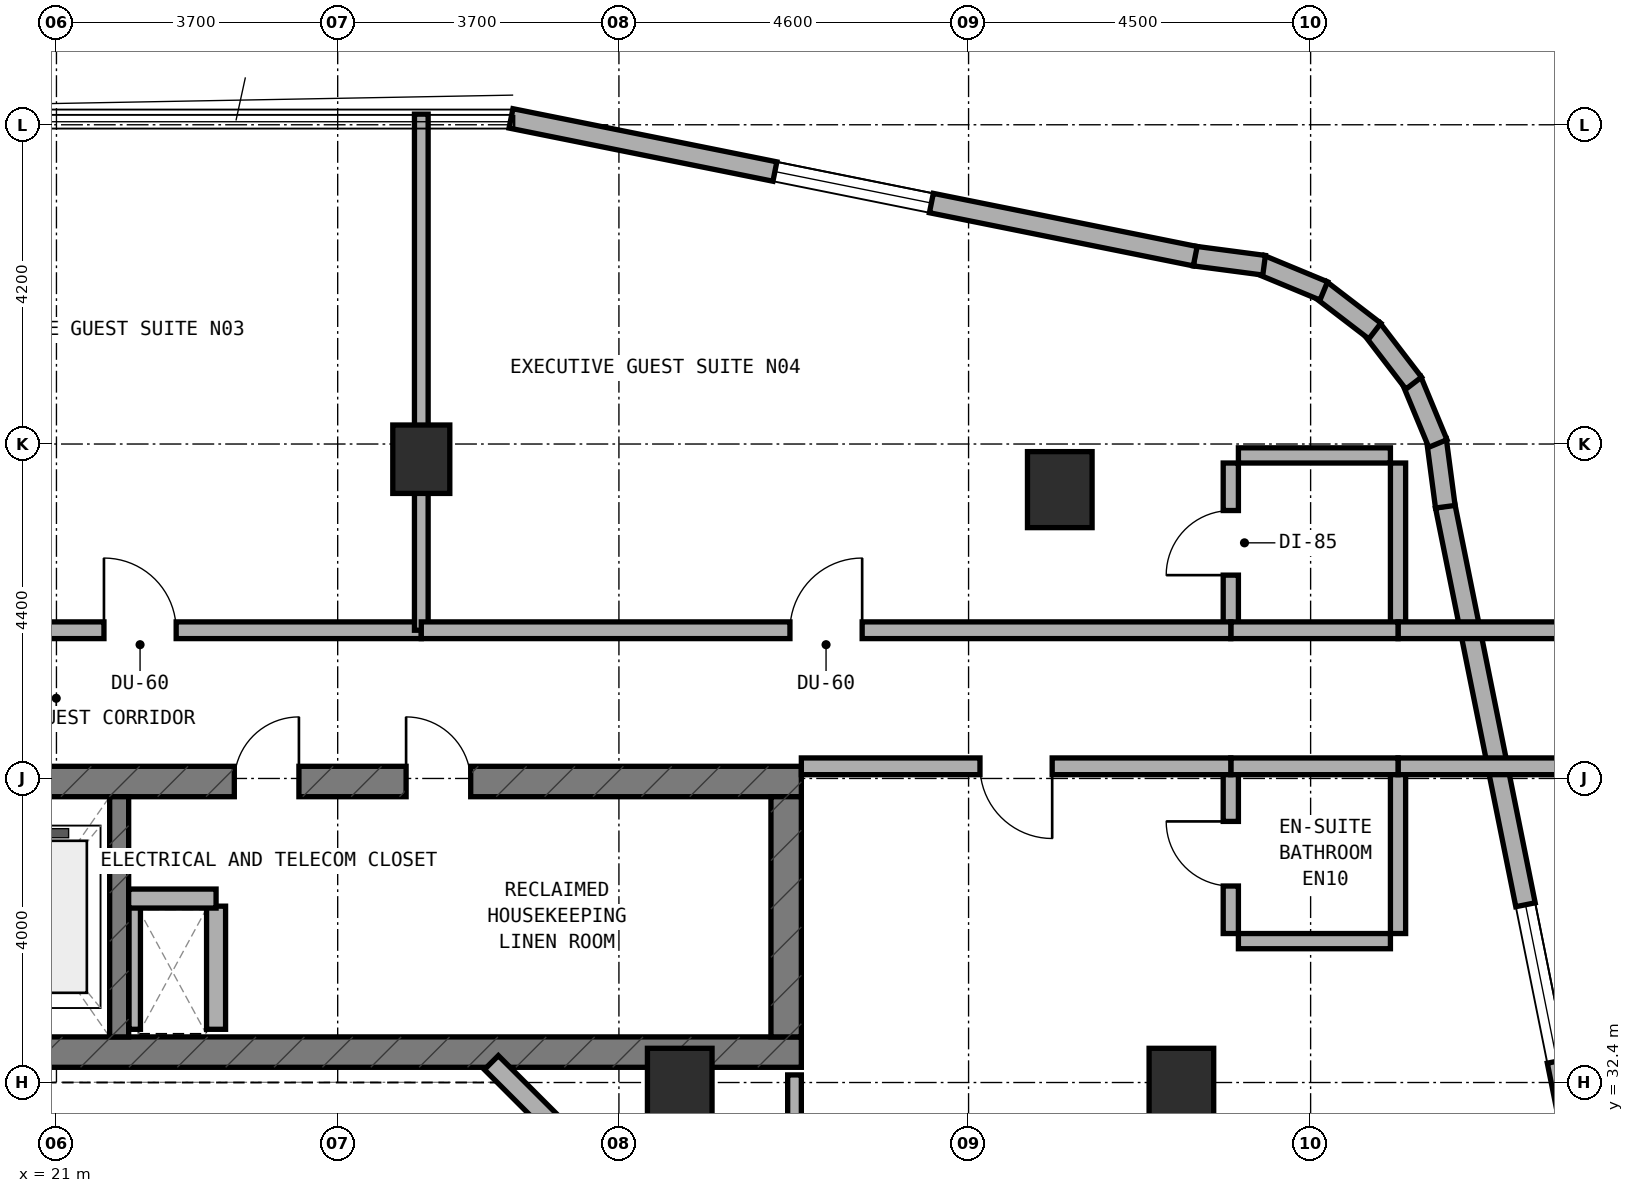
"""IFC4 building model, lengths in metres.
Left out: names, types, materials, properties, quantities, classifications, styles, units other than length and angle.
Written with IfcOpenShell. Run it as: python <this file> out.ifc"""

import sys

from ifc_helpers import new_model, si_unit, direction, frame, frame_2d, origin, origin_2d, place, context, subcontext, project, spatial, rectangle, extrude, element, fill, save


model = new_model("IFC4")
c1 = context("Model", 3, precision=1e-05, world=origin(), true_north=direction((0.0, 1.0)))
c2 = subcontext(c1, "Body", "Model", "MODEL_VIEW")
j1 = project(units=[si_unit("LENGTHUNIT", "METRE"), si_unit("PLANEANGLEUNIT", "RADIAN")], contexts=[c1])
p1 = place(None, origin())
s1 = spatial("IfcSite", under=j1, at=p1, CompositionType="ELEMENT")
p2 = place(p1, origin())
s2 = spatial("IfcBuilding", under=s1, at=p2, CompositionType="ELEMENT")
p3 = place(p2, frame((0.0, 0.0, 159.0)))
s3 = spatial("IfcBuildingStorey", under=s2, at=p3, CompositionType="ELEMENT", Elevation=159.0)
p4 = place(p3, frame((6.4, 32.8, 0.0), z_axis=(0.0, 0.0, 1.0), x_axis=(1.0, 0.0, 0.0)))
e1 = element("IfcWall", 1, at=p4, inside=s3, PredefinedType="SHEAR", context=c2, shape_type="SweptSolid", body=[
    extrude(rectangle(XDim=24.4, YDim=0.4, at=frame_2d((12.2, 0.0))), origin(), (0.0, 0.0, 1.0), 3.5),
])
p5 = place(p4, frame((6.05, 0.0, 0.0)))
e2 = element("IfcOpeningElement", 2, at=p5, cuts=e1, PredefinedType="OPENING", context=c2, shape_type="SweptSolid", body=[
    extrude(rectangle(XDim=1.1, YDim=2.15, at=frame_2d((0.55, 1.075))), frame((0.0, 0.21, 0.0), z_axis=(0.0, -1.0, 0.0), x_axis=(1.0, 0.0, 0.0)), (0.0, 0.0, 1.0), 0.42),
])
p6 = place(p3, frame((6.4, 36.36, 0.0), z_axis=(0.0, 0.0, 1.0), x_axis=(1.0, 0.0, 0.0)))
e3 = element("IfcWall", 3, at=p6, inside=s3, PredefinedType="SHEAR", context=c2, shape_type="SweptSolid", body=[
    extrude(rectangle(XDim=24.4, YDim=0.4, at=frame_2d((12.2, 0.0))), origin(), (0.0, 0.0, 1.0), 3.5),
])
p7 = place(p6, frame((9.15, 0.0, 0.0)))
e4 = element("IfcOpeningElement", 4, at=p7, cuts=e3, PredefinedType="OPENING", context=c2, shape_type="SweptSolid", body=[
    extrude(rectangle(XDim=1.2, YDim=2.15, at=frame_2d((0.6, 1.075))), frame((0.0, 0.21, 0.0), z_axis=(0.0, -1.0, 0.0), x_axis=(1.0, 0.0, 0.0)), (0.0, 0.0, 1.0), 0.42),
])
p8 = place(p6, frame((19.2, 0.0, 0.0)))
e5 = element("IfcOpeningElement", 5, at=p8, cuts=e3, PredefinedType="OPENING", context=c2, shape_type="SweptSolid", body=[
    extrude(rectangle(XDim=0.85, YDim=2.1, at=frame_2d((0.425, 1.05))), frame((0.0, 0.21, 0.0), z_axis=(0.0, -1.0, 0.0), x_axis=(1.0, 0.0, 0.0)), (0.0, 0.0, 1.0), 0.42),
])
p9 = place(p6, frame((16.94, 0.0, 0.0)))
e6 = element("IfcOpeningElement", 6, at=p9, cuts=e3, PredefinedType="OPENING", context=c2, shape_type="SweptSolid", body=[
    extrude(rectangle(XDim=0.85, YDim=2.1, at=frame_2d((0.425, 1.05))), frame((0.0, 0.21, 0.0), z_axis=(0.0, -1.0, 0.0), x_axis=(1.0, 0.0, 0.0)), (0.0, 0.0, 1.0), 0.42),
])
p10 = place(p3, frame((30.6, 33.0, 0.0), z_axis=(0.0, 0.0, 1.0), x_axis=(0.0, 1.0, 0.0)))
e7 = element("IfcWall", 7, at=p10, inside=s3, PredefinedType="SHEAR", context=c2, shape_type="SweptSolid", body=[
    extrude(rectangle(XDim=3.16, YDim=0.4, at=frame_2d((1.58, 0.0))), origin(), (0.0, 0.0, 1.0), 3.5),
])
p11 = place(p3, frame((21.825, 33.0, 0.0), z_axis=(0.0, 0.0, 1.0), x_axis=(0.0, 1.0, 0.0)))
e8 = element("IfcWall", 8, at=p11, inside=s3, PredefinedType="STANDARD", context=c2, shape_type="SweptSolid", body=[
    extrude(rectangle(XDim=3.16, YDim=0.25, at=frame_2d((1.58, 0.0))), origin(), (0.0, 0.0, 1.0), 3.22),
])
p12 = place(p3, frame((25.8, 40.6, 0.0), z_axis=(0.0, 0.0, 1.0), x_axis=(1.0, 0.0, 0.0)))
e9 = element("IfcColumn", 9, at=p12, inside=s3, PredefinedType="COLUMN", context=c2, shape_type="SweptSolid", body=[
    extrude(rectangle(XDim=0.75, YDim=0.9, at=origin_2d()), origin(), (0.0, 0.0, 1.0), 3.5),
])
for number, where, z_axis, x_axis in (
    (10, (34.2, 40.2, 0.0), (0.0, 0.0, 1.0), (1.0, 0.0, 0.0)),
    (11, (35.8, 32.35, 0.0), (0.0, 0.0, 1.0), (1.0, 0.0, 0.0)),
    (12, (29.2, 32.35, 0.0), (0.0, 0.0, 1.0), (1.0, 0.0, 0.0)),
):
    element("IfcColumn", number, at=place(p3, frame(where, z_axis=z_axis, x_axis=x_axis)), inside=s3, PredefinedType="COLUMN", context=c2, shape_type="SweptSolid", body=[
        extrude(rectangle(XDim=0.85, YDim=1.0, at=origin_2d()), origin(), (0.0, 0.0, 1.0), 3.5),
    ])
p13 = place(p3, frame((41.084, 30.98, 0.0), z_axis=(0.0, 0.0, 1.0), x_axis=(-0.197435082048, 0.980315963543, 0.0)))
e13 = element("IfcWall", 13, at=p13, inside=s3, PredefinedType="STANDARD", context=c2, shape_type="SweptSolid", body=[
    extrude(rectangle(XDim=9.183, YDim=0.26, at=frame_2d((4.591, 0.0))), origin(), (0.0, 0.0, 1.0), 3.22),
])
p14 = place(p13, frame((1.734, 0.0, 0.85)))
e14 = element("IfcOpeningElement", 14, at=p14, cuts=e13, PredefinedType="OPENING", context=c2, shape_type="SweptSolid", body=[
    extrude(rectangle(XDim=2.1, YDim=1.5, at=frame_2d((1.05, 0.75))), frame((0.0, 0.14, 0.0), z_axis=(0.0, -1.0, 0.0), x_axis=(1.0, 0.0, 0.0)), (0.0, 0.0, 1.0), 0.28),
])
p15 = place(p3, frame((39.272, 39.975, 0.0), z_axis=(0.0, 0.0, 1.0), x_axis=(-0.130953706898, 0.991388484223, 0.0)))
e15 = element("IfcWall", 15, at=p15, inside=s3, PredefinedType="STANDARD", context=c2, shape_type="SweptSolid", body=[
    extrude(rectangle(XDim=0.885, YDim=0.26, at=frame_2d((0.443, 0.0))), origin(), (0.0, 0.0, 1.0), 3.22),
])
p16 = place(p3, frame((39.174, 40.807, 0.0), z_axis=(0.0, 0.0, 1.0), x_axis=(-0.383290660547, 0.923627776508, 0.0)))
e16 = element("IfcWall", 16, at=p16, inside=s3, PredefinedType="STANDARD", context=c2, shape_type="SweptSolid", body=[
    extrude(rectangle(XDim=0.903, YDim=0.26, at=frame_2d((0.452, 0.0))), origin(), (0.0, 0.0, 1.0), 3.22),
])
p17 = place(p3, frame((38.856, 41.601, 0.0), z_axis=(0.0, 0.0, 1.0), x_axis=(-0.608624690463, 0.793458244748, 0.0)))
e17 = element("IfcWall", 17, at=p17, inside=s3, PredefinedType="STANDARD", context=c2, shape_type="SweptSolid", body=[
    extrude(rectangle(XDim=0.902, YDim=0.26, at=frame_2d((0.451, 0.0))), origin(), (0.0, 0.0, 1.0), 3.22),
])
p18 = place(p3, frame((38.345, 42.286, 0.0), z_axis=(0.0, 0.0, 1.0), x_axis=(-0.793558456666, 0.608494022858, 0.0)))
e18 = element("IfcWall", 18, at=p18, inside=s3, PredefinedType="STANDARD", context=c2, shape_type="SweptSolid", body=[
    extrude(rectangle(XDim=0.902, YDim=0.26, at=frame_2d((0.451, 0.0))), origin(), (0.0, 0.0, 1.0), 3.22),
])
p19 = place(p3, frame((37.673, 42.814, 0.0), z_axis=(0.0, 0.0, 1.0), x_axis=(-0.923683767999, 0.383155708213, 0.0)))
e19 = element("IfcWall", 19, at=p19, inside=s3, PredefinedType="STANDARD", context=c2, shape_type="SweptSolid", body=[
    extrude(rectangle(XDim=0.903, YDim=0.26, at=frame_2d((0.451, 0.0))), origin(), (0.0, 0.0, 1.0), 3.22),
])
p20 = place(p3, frame((36.888, 43.152, 0.0), z_axis=(0.0, 0.0, 1.0), x_axis=(-0.991487658083, 0.130200706103, 0.0)))
e20 = element("IfcWall", 20, at=p20, inside=s3, PredefinedType="STANDARD", context=c2, shape_type="SweptSolid", body=[
    extrude(rectangle(XDim=0.921, YDim=0.26, at=frame_2d((0.46, 0.0))), origin(), (0.0, 0.0, 1.0), 3.22),
])
p21 = place(p3, frame((35.982, 43.271, 0.0), z_axis=(0.0, 0.0, 1.0), x_axis=(-0.980315963543, 0.197435082048, 0.0)))
e21 = element("IfcWall", 21, at=p21, inside=s3, PredefinedType="STANDARD", context=c2, shape_type="SweptSolid", body=[
    extrude(rectangle(XDim=9.183, YDim=0.26, at=frame_2d((4.591, 0.0))), origin(), (0.0, 0.0, 1.0), 3.22),
])
p22 = place(p21, frame((3.541, 0.0, 0.85)))
e22 = element("IfcOpeningElement", 22, at=p22, cuts=e21, PredefinedType="OPENING", context=c2, shape_type="SweptSolid", body=[
    extrude(rectangle(XDim=2.1, YDim=1.5, at=frame_2d((1.05, 0.75))), frame((0.0, 0.14, 0.0), z_axis=(0.0, -1.0, 0.0), x_axis=(1.0, 0.0, 0.0)), (0.0, 0.0, 1.0), 0.28),
])
p23 = place(p3, frame((28.556, 30.828, 0.0), z_axis=(0.0, 0.0, 1.0), x_axis=(-0.707059717605, 0.707153841636, 0.0)))
e23 = element("IfcWall", 23, at=p23, inside=s3, PredefinedType="STANDARD", context=c2, shape_type="SweptSolid", body=[
    extrude(rectangle(XDim=2.594, YDim=0.26, at=frame_2d((1.297, 0.0))), origin(), (0.0, 0.0, 1.0), 3.22),
])
p24 = place(p3, frame((22.03, 33.1, 0.0), z_axis=(0.0, 0.0, 1.0), x_axis=(0.0, 1.0, 0.0)))
e24 = element("IfcWall", 24, at=p24, inside=s3, PredefinedType="PARTITIONING", context=c2, shape_type="SweptSolid", body=[
    extrude(rectangle(XDim=1.62, YDim=0.15, at=frame_2d((0.81, 0.0))), origin(), (0.0, 0.0, 1.0), 3.22),
])
p25 = place(p3, frame((23.1, 33.1, 0.0), z_axis=(0.0, 0.0, 1.0), x_axis=(0.0, 1.0, 0.0)))
e25 = element("IfcWall", 25, at=p25, inside=s3, PredefinedType="SOLIDWALL", context=c2, shape_type="SweptSolid", body=[
    extrude(rectangle(XDim=1.62, YDim=0.25, at=frame_2d((0.81, 0.0))), origin(), (0.0, 0.0, 1.0), 3.22),
])
p26 = place(p3, frame((21.95, 34.82, 0.0), z_axis=(0.0, 0.0, 1.0), x_axis=(1.0, 0.0, 0.0)))
e26 = element("IfcWall", 26, at=p26, inside=s3, PredefinedType="SOLIDWALL", context=c2, shape_type="SweptSolid", body=[
    extrude(rectangle(XDim=1.15, YDim=0.25, at=frame_2d((0.575, 0.0))), origin(), (0.0, 0.0, 1.0), 3.22),
])
p27 = place(p3, frame((18.4, 38.35, 0.0), z_axis=(0.0, 0.0, 1.0), x_axis=(1.0, 0.0, 0.0)))
e27 = element("IfcWall", 27, at=p27, inside=s3, PredefinedType="SOLIDWALL", context=c2, shape_type="SweptSolid", body=[
    extrude(rectangle(XDim=7.4, YDim=0.22, at=frame_2d((3.7, 0.0))), origin(), (0.0, 0.0, 1.0), 2.795),
])
p28 = place(p27, frame((3.225, 0.0, 0.0)))
e28 = element("IfcOpeningElement", 28, at=p28, cuts=e27, PredefinedType="OPENING", context=c2, shape_type="SweptSolid", body=[
    extrude(rectangle(XDim=0.95, YDim=2.1, at=frame_2d((0.475, 1.05))), frame((0.0, 0.12, 0.0), z_axis=(0.0, -1.0, 0.0), x_axis=(1.0, 0.0, 0.0)), (0.0, 0.0, 1.0), 0.24),
])
p29 = place(p3, frame((25.8, 38.35, 0.0), z_axis=(0.0, 0.0, 1.0), x_axis=(0.0, 1.0, 0.0)))
e29 = element("IfcWall", 29, at=p29, inside=s3, PredefinedType="SOLIDWALL", context=c2, shape_type="SweptSolid", body=[
    extrude(rectangle(XDim=6.79, YDim=0.18, at=frame_2d((3.395, 0.0))), origin(), (0.0, 0.0, 1.0), 2.795),
])
p30 = place(p3, frame((36.45, 38.45, 0.0), z_axis=(0.0, 0.0, 1.0), x_axis=(0.0, 1.0, 0.0)))
e30 = element("IfcWall", 30, at=p30, inside=s3, PredefinedType="PLUMBINGWALL", context=c2, shape_type="SweptSolid", body=[
    extrude(rectangle(XDim=2.1, YDim=0.2, at=frame_2d((1.05, 0.0))), origin(), (0.0, 0.0, 1.0), 3.22),
])
p31 = place(p30, frame((0.625, 0.0, 0.0)))
e31 = element("IfcOpeningElement", 31, at=p31, cuts=e30, PredefinedType="OPENING", context=c2, shape_type="SweptSolid", body=[
    extrude(rectangle(XDim=0.85, YDim=2.1, at=frame_2d((0.425, 1.05))), frame((0.0, 0.11, 0.0), z_axis=(0.0, -1.0, 0.0), x_axis=(1.0, 0.0, 0.0)), (0.0, 0.0, 1.0), 0.22),
])
p32 = place(p3, frame((36.55, 40.65, 0.0), z_axis=(0.0, 0.0, 1.0), x_axis=(1.0, 0.0, 0.0)))
e32 = element("IfcWall", 32, at=p32, inside=s3, PredefinedType="PLUMBINGWALL", context=c2, shape_type="SweptSolid", body=[
    extrude(rectangle(XDim=2.0, YDim=0.2, at=frame_2d((1.0, 0.0))), origin(), (0.0, 0.0, 1.0), 3.22),
])
p33 = place(p3, frame((38.65, 38.45, 0.0), z_axis=(0.0, 0.0, 1.0), x_axis=(0.0, 1.0, 0.0)))
e33 = element("IfcWall", 33, at=p33, inside=s3, PredefinedType="PLUMBINGWALL", context=c2, shape_type="SweptSolid", body=[
    extrude(rectangle(XDim=2.1, YDim=0.2, at=frame_2d((1.05, 0.0))), origin(), (0.0, 0.0, 1.0), 3.22),
])
p34 = place(p3, frame((38.65, 38.35, 0.0), z_axis=(0.0, 0.0, 1.0), x_axis=(1.0, 0.0, 0.0)))
e34 = element("IfcWall", 34, at=p34, inside=s3, PredefinedType="SOLIDWALL", context=c2, shape_type="SweptSolid", body=[
    extrude(rectangle(XDim=2.39, YDim=0.22, at=frame_2d((1.195, 0.0))), origin(), (0.0, 0.0, 1.0), 3.22),
])
p35 = place(p3, frame((36.45, 38.35, 0.0), z_axis=(0.0, 0.0, 1.0), x_axis=(1.0, 0.0, 0.0)))
e35 = element("IfcWall", 35, at=p35, inside=s3, PredefinedType="SOLIDWALL", context=c2, shape_type="SweptSolid", body=[
    extrude(rectangle(XDim=2.2, YDim=0.22, at=frame_2d((1.1, 0.0))), origin(), (0.0, 0.0, 1.0), 3.22),
])
p36 = place(p3, frame((25.8, 38.35, 0.0), z_axis=(0.0, 0.0, 1.0), x_axis=(1.0, 0.0, 0.0)))
e36 = element("IfcWall", 36, at=p36, inside=s3, PredefinedType="SOLIDWALL", context=c2, shape_type="SweptSolid", body=[
    extrude(rectangle(XDim=10.65, YDim=0.22, at=frame_2d((5.325, 0.0))), origin(), (0.0, 0.0, 1.0), 2.795),
])
p37 = place(p36, frame((4.85, 0.0, 0.0)))
e37 = element("IfcOpeningElement", 37, at=p37, cuts=e36, PredefinedType="OPENING", context=c2, shape_type="SweptSolid", body=[
    extrude(rectangle(XDim=0.95, YDim=2.1, at=frame_2d((0.475, 1.05))), frame((0.0, 0.12, 0.0), z_axis=(0.0, -1.0, 0.0), x_axis=(1.0, 0.0, 0.0)), (0.0, 0.0, 1.0), 0.24),
])
p38 = place(p3, frame((30.71, 17.5, 0.0), z_axis=(0.0, 0.0, 1.0), x_axis=(0.0, 1.0, 0.0)))
e38 = element("IfcWall", 38, at=p38, inside=s3, PredefinedType="SOLIDWALL", context=c2, shape_type="SweptSolid", body=[
    extrude(rectangle(XDim=15.0, YDim=0.18, at=frame_2d((7.5, 0.0))), origin(), (0.0, 0.0, 1.0), 2.795),
])
p39 = place(p3, frame((36.45, 34.36, 0.0), z_axis=(0.0, 0.0, 1.0), x_axis=(0.0, 1.0, 0.0)))
e39 = element("IfcWall", 39, at=p39, inside=s3, PredefinedType="PLUMBINGWALL", context=c2, shape_type="SweptSolid", body=[
    extrude(rectangle(XDim=2.1, YDim=0.2, at=frame_2d((1.05, 0.0))), origin(), (0.0, 0.0, 1.0), 3.22),
])
p40 = place(p39, frame((0.625, 0.0, 0.0)))
e40 = element("IfcOpeningElement", 40, at=p40, cuts=e39, PredefinedType="OPENING", context=c2, shape_type="SweptSolid", body=[
    extrude(rectangle(XDim=0.85, YDim=2.1, at=frame_2d((0.425, 1.05))), frame((0.0, 0.11, 0.0), z_axis=(0.0, -1.0, 0.0), x_axis=(1.0, 0.0, 0.0)), (0.0, 0.0, 1.0), 0.22),
])
p41 = place(p3, frame((36.55, 34.26, 0.0), z_axis=(0.0, 0.0, 1.0), x_axis=(1.0, 0.0, 0.0)))
e41 = element("IfcWall", 41, at=p41, inside=s3, PredefinedType="PLUMBINGWALL", context=c2, shape_type="SweptSolid", body=[
    extrude(rectangle(XDim=2.0, YDim=0.2, at=frame_2d((1.0, 0.0))), origin(), (0.0, 0.0, 1.0), 3.22),
])
p42 = place(p3, frame((38.65, 34.36, 0.0), z_axis=(0.0, 0.0, 1.0), x_axis=(0.0, 1.0, 0.0)))
e42 = element("IfcWall", 42, at=p42, inside=s3, PredefinedType="PLUMBINGWALL", context=c2, shape_type="SweptSolid", body=[
    extrude(rectangle(XDim=2.1, YDim=0.2, at=frame_2d((1.05, 0.0))), origin(), (0.0, 0.0, 1.0), 3.22),
])
p43 = place(p3, frame((38.65, 36.56, 0.0), z_axis=(0.0, 0.0, 1.0), x_axis=(1.0, 0.0, 0.0)))
e43 = element("IfcWall", 43, at=p43, inside=s3, PredefinedType="SOLIDWALL", context=c2, shape_type="SweptSolid", body=[
    extrude(rectangle(XDim=2.55, YDim=0.22, at=frame_2d((1.275, 0.0))), origin(), (0.0, 0.0, 1.0), 3.22),
])
p44 = place(p3, frame((36.45, 36.56, 0.0), z_axis=(0.0, 0.0, 1.0), x_axis=(1.0, 0.0, 0.0)))
e44 = element("IfcWall", 44, at=p44, inside=s3, PredefinedType="SOLIDWALL", context=c2, shape_type="SweptSolid", body=[
    extrude(rectangle(XDim=2.2, YDim=0.22, at=frame_2d((1.1, 0.0))), origin(), (0.0, 0.0, 1.0), 3.22),
])
p45 = place(p3, frame((30.8, 36.56, 0.0), z_axis=(0.0, 0.0, 1.0), x_axis=(1.0, 0.0, 0.0)))
e45 = element("IfcWall", 45, at=p45, inside=s3, PredefinedType="SOLIDWALL", context=c2, shape_type="SweptSolid", body=[
    extrude(rectangle(XDim=5.65, YDim=0.22, at=frame_2d((2.825, 0.0))), origin(), (0.0, 0.0, 1.0), 2.795),
])
p46 = place(p45, frame((2.35, 0.0, 0.0)))
e46 = element("IfcOpeningElement", 46, at=p46, cuts=e45, PredefinedType="OPENING", context=c2, shape_type="SweptSolid", body=[
    extrude(rectangle(XDim=0.95, YDim=2.1, at=frame_2d((0.475, 1.05))), frame((0.0, 0.12, 0.0), z_axis=(0.0, -1.0, 0.0), x_axis=(1.0, 0.0, 0.0)), (0.0, 0.0, 1.0), 0.24),
])
p47 = place(p14, origin())
e47 = element("IfcWindow", 47, at=p47, inside=s3, PartitioningType="SINGLE_PANEL", PredefinedType="WINDOW", context=c2, shape_type="SweptSolid", body=[
    extrude(rectangle(XDim=2.1, YDim=1.5, at=frame_2d((1.05, 0.75))), frame((0.0, 0.03, 0.0), z_axis=(0.0, -1.0, 0.0), x_axis=(1.0, 0.0, 0.0)), (0.0, 0.0, 1.0), 0.06),
])
fill(e14, e47)
p48 = place(p22, origin())
e48 = element("IfcWindow", 48, at=p48, inside=s3, PartitioningType="SINGLE_PANEL", PredefinedType="WINDOW", context=c2, shape_type="SweptSolid", body=[
    extrude(rectangle(XDim=2.1, YDim=1.5, at=frame_2d((1.05, 0.75))), frame((0.0, 0.03, 0.0), z_axis=(0.0, -1.0, 0.0), x_axis=(1.0, 0.0, 0.0)), (0.0, 0.0, 1.0), 0.06),
])
fill(e22, e48)
p49 = place(p8, origin())
e49 = element("IfcDoor", 49, at=p49, inside=s3, OperationType="SINGLE_SWING_LEFT", PredefinedType="DOOR", context=c2, shape_type="SweptSolid", body=[
    extrude(rectangle(XDim=0.85, YDim=2.1, at=frame_2d((0.425, 1.05))), frame((0.0, 0.025, 0.0), z_axis=(0.0, -1.0, 0.0), x_axis=(1.0, 0.0, 0.0)), (0.0, 0.0, 1.0), 0.05),
])
fill(e5, e49)
p50 = place(p9, origin())
e50 = element("IfcDoor", 50, at=p50, inside=s3, OperationType="SINGLE_SWING_RIGHT", PredefinedType="DOOR", context=c2, shape_type="SweptSolid", body=[
    extrude(rectangle(XDim=0.85, YDim=2.1, at=frame_2d((0.425, 1.05))), frame((0.0, 0.025, 0.0), z_axis=(0.0, -1.0, 0.0), x_axis=(1.0, 0.0, 0.0)), (0.0, 0.0, 1.0), 0.05),
])
fill(e6, e50)
p51 = place(p28, origin())
e51 = element("IfcDoor", 51, at=p51, inside=s3, OperationType="SINGLE_SWING_LEFT", PredefinedType="DOOR", context=c2, shape_type="SweptSolid", body=[
    extrude(rectangle(XDim=0.95, YDim=2.1, at=frame_2d((0.475, 1.05))), frame((0.0, 0.025, 0.0), z_axis=(0.0, -1.0, 0.0), x_axis=(1.0, 0.0, 0.0)), (0.0, 0.0, 1.0), 0.05),
])
fill(e28, e51)
p52 = place(p31, origin())
e52 = element("IfcDoor", 52, at=p52, inside=s3, OperationType="SINGLE_SWING_LEFT", PredefinedType="DOOR", context=c2, shape_type="SweptSolid", body=[
    extrude(rectangle(XDim=0.85, YDim=2.1, at=frame_2d((0.425, 1.05))), frame((0.0, 0.025, 0.0), z_axis=(0.0, -1.0, 0.0), x_axis=(1.0, 0.0, 0.0)), (0.0, 0.0, 1.0), 0.05),
])
fill(e31, e52)
p53 = place(p37, origin())
e53 = element("IfcDoor", 53, at=p53, inside=s3, OperationType="SINGLE_SWING_RIGHT", PredefinedType="DOOR", context=c2, shape_type="SweptSolid", body=[
    extrude(rectangle(XDim=0.95, YDim=2.1, at=frame_2d((0.475, 1.05))), frame((0.0, 0.025, 0.0), z_axis=(0.0, -1.0, 0.0), x_axis=(1.0, 0.0, 0.0)), (0.0, 0.0, 1.0), 0.05),
])
fill(e37, e53)
p54 = place(p40, origin())
e54 = element("IfcDoor", 54, at=p54, inside=s3, OperationType="SINGLE_SWING_RIGHT", PredefinedType="DOOR", context=c2, shape_type="SweptSolid", body=[
    extrude(rectangle(XDim=0.85, YDim=2.1, at=frame_2d((0.425, 1.05))), frame((0.0, 0.025, 0.0), z_axis=(0.0, -1.0, 0.0), x_axis=(1.0, 0.0, 0.0)), (0.0, 0.0, 1.0), 0.05),
])
fill(e40, e54)
p55 = place(p46, frame((0.95, 0.0, 0.0), z_axis=(0.0, 0.0, 1.0), x_axis=(-1.0, 0.0, 0.0)))
e55 = element("IfcDoor", 55, at=p55, inside=s3, OperationType="SINGLE_SWING_LEFT", PredefinedType="DOOR", context=c2, shape_type="SweptSolid", body=[
    extrude(rectangle(XDim=0.95, YDim=2.1, at=frame_2d((0.475, 1.05))), frame((0.0, 0.025, 0.0), z_axis=(0.0, -1.0, 0.0), x_axis=(1.0, 0.0, 0.0)), (0.0, 0.0, 1.0), 0.05),
])
fill(e46, e55)
save(model, sys.argv[1])
